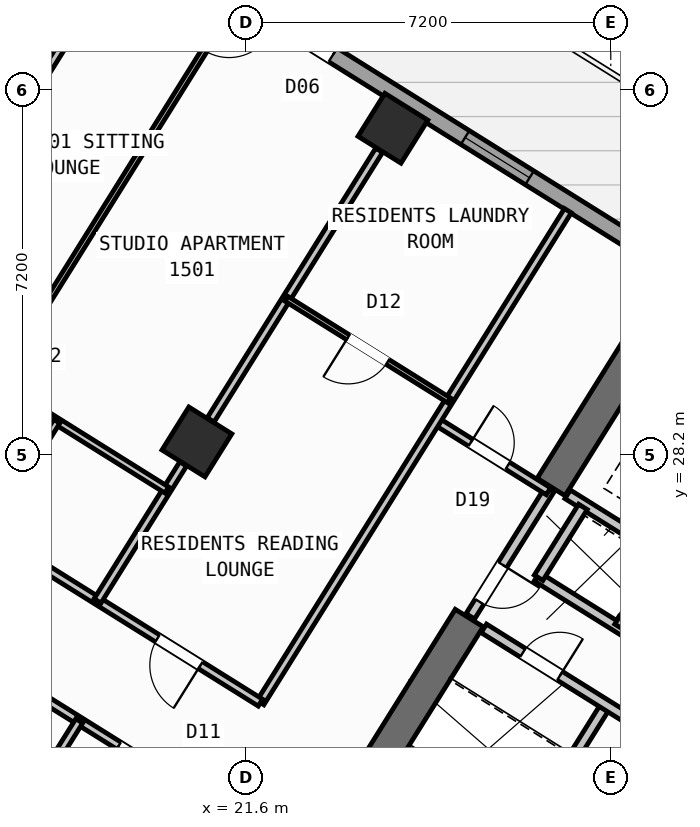
"""IFC4 building model, lengths in metres.
Left out: names, types, materials, properties, quantities, classifications, styles, units other than length and angle.
Written with IfcOpenShell. Run it as: python <this file> out.ifc"""

import sys

from ifc_helpers import new_model, si_unit, direction, frame, frame_2d, origin, origin_2d, place, context, subcontext, project, spatial, rectangle, hollow_rectangle, extrude, source, transform, mapped, element, fill, save


model = new_model("IFC4")
c1 = context("Model", 3, precision=1e-05, world=origin(), true_north=direction((0.0, 1.0)))
c2 = subcontext(c1, "Body", "Model", "MODEL_VIEW")
j1 = project(units=[si_unit("LENGTHUNIT", "METRE"), si_unit("PLANEANGLEUNIT", "RADIAN")], contexts=[c1])
p1 = place(None, origin())
s1 = spatial("IfcSite", under=j1, at=p1, CompositionType="ELEMENT")
p2 = place(p1, origin())
s2 = spatial("IfcBuilding", under=s1, at=p2, CompositionType="ELEMENT")
p3 = place(p2, frame((0.0, 0.0, 60.0)))
s3 = spatial("IfcBuildingStorey", under=s2, at=p3, CompositionType="ELEMENT", Elevation=60.0)
p4 = place(p3, frame((29.491, 30.552, 0.0), z_axis=(0.0, 0.0, 1.0), x_axis=(-0.529893103397, -0.8480644427, 0.0)))
e1 = element("IfcWall", 1, at=p4, inside=s3, PredefinedType="SHEAR", context=c2, shape_type="SweptSolid", body=[
    extrude(rectangle(XDim=3.525, YDim=0.65, at=frame_2d((1.763, 0.0))), origin(), (0.0, 0.0, 1.0), 3.35),
])
p5 = place(p3, frame((26.007, 24.976, 0.0), z_axis=(0.0, 0.0, 1.0), x_axis=(-0.529916319127, -0.848049936456, 0.0)))
e2 = element("IfcWall", 2, at=p5, inside=s3, PredefinedType="SHEAR", context=c2, shape_type="SweptSolid", body=[
    extrude(rectangle(XDim=6.375, YDim=0.65, at=frame_2d((3.188, 0.0))), origin(), (0.0, 0.0, 1.0), 3.35),
])
m1 = source(origin(), c2, "Body", "SweptSolid", [
    extrude(hollow_rectangle(XDim=1.0, YDim=1.0, WallThickness=0.04, at=origin_2d()), origin(), (0.0, 0.0, 1.0), 3.6),
])
for number, where, z_axis, x_axis in (
    (3, (24.5, 34.643, 0.0), (0.0, 0.0, 1.0), (-0.848, 0.53, 0.0)),
    (4, (20.632, 28.452, 0.0), (0.0, 0.0, 1.0), (-0.848, 0.53, 0.0)),
):
    element("IfcColumn", number, at=place(p3, frame(where, z_axis=z_axis, x_axis=x_axis)), inside=s3, PredefinedType="COLUMN", context=c2, shape_type="MappedRepresentation", body=[
        mapped(m1, transform((0.0, 0.0, 0.0), scale=1.0)),
    ])
p6 = place(p3, frame((29.268, 6.429, 0.0), z_axis=(0.0, 0.0, 1.0), x_axis=(-0.848049971435, 0.529916263149, 0.0)))
e5 = element("IfcWall", 5, at=p6, inside=s3, PredefinedType="STANDARD", context=c2, shape_type="SweptSolid", body=[
    extrude(rectangle(XDim=31.588, YDim=0.32, at=frame_2d((15.794, 0.0))), origin(), (0.0, 0.0, 1.0), 3.35),
])
p7 = place(p6, frame((16.235, 0.0, 0.0)))
e6 = element("IfcOpeningElement", 6, at=p7, cuts=e5, PredefinedType="OPENING", context=c2, shape_type="SweptSolid", body=[
    extrude(rectangle(XDim=1.2, YDim=2.15, at=frame_2d((0.6, 1.075))), frame((0.0, 0.17, 0.0), z_axis=(0.0, -1.0, 0.0), x_axis=(1.0, 0.0, 0.0)), (0.0, 0.0, 1.0), 0.34),
])
p8 = place(p6, frame((2.989, 0.0, 0.8)))
e7 = element("IfcOpeningElement", 7, at=p8, cuts=e5, PredefinedType="OPENING", context=c2, shape_type="SweptSolid", body=[
    extrude(rectangle(XDim=2.1, YDim=1.55, at=frame_2d((1.05, 0.775))), frame((0.0, 0.17, 0.0), z_axis=(0.0, -1.0, 0.0), x_axis=(1.0, 0.0, 0.0)), (0.0, 0.0, 1.0), 0.34),
])
p9 = place(p6, frame((8.359, 0.0, 0.8)))
e8 = element("IfcOpeningElement", 8, at=p9, cuts=e5, PredefinedType="OPENING", context=c2, shape_type="SweptSolid", body=[
    extrude(rectangle(XDim=2.1, YDim=1.55, at=frame_2d((1.05, 0.775))), frame((0.0, 0.17, 0.0), z_axis=(0.0, -1.0, 0.0), x_axis=(1.0, 0.0, 0.0)), (0.0, 0.0, 1.0), 0.34),
])
p10 = place(p6, frame((13.284, 0.0, 0.95)))
e9 = element("IfcOpeningElement", 9, at=p10, cuts=e5, PredefinedType="OPENING", context=c2, shape_type="SweptSolid", body=[
    extrude(rectangle(XDim=1.2, YDim=1.4, at=frame_2d((0.6, 0.7))), frame((0.0, 0.17, 0.0), z_axis=(0.0, -1.0, 0.0), x_axis=(1.0, 0.0, 0.0)), (0.0, 0.0, 1.0), 0.34),
])
p11 = place(p6, frame((22.374, 0.0, 0.95)))
e10 = element("IfcOpeningElement", 10, at=p11, cuts=e5, PredefinedType="OPENING", context=c2, shape_type="SweptSolid", body=[
    extrude(rectangle(XDim=1.2, YDim=1.4, at=frame_2d((0.6, 0.7))), frame((0.0, 0.17, 0.0), z_axis=(0.0, -1.0, 0.0), x_axis=(1.0, 0.0, 0.0)), (0.0, 0.0, 1.0), 0.34),
])
p12 = place(p6, frame((26.351, 0.0, 1.0)))
e11 = element("IfcOpeningElement", 11, at=p12, cuts=e5, PredefinedType="OPENING", context=c2, shape_type="SweptSolid", body=[
    extrude(rectangle(XDim=0.9, YDim=1.25, at=frame_2d((0.45, 0.625))), frame((0.0, 0.17, 0.0), z_axis=(0.0, -1.0, 0.0), x_axis=(1.0, 0.0, 0.0)), (0.0, 0.0, 1.0), 0.34),
])
p13 = place(p6, frame((29.052, 0.0, 0.85)))
e12 = element("IfcOpeningElement", 12, at=p13, cuts=e5, PredefinedType="OPENING", context=c2, shape_type="SweptSolid", body=[
    extrude(rectangle(XDim=1.8, YDim=1.5, at=frame_2d((0.9, 0.75))), frame((0.0, 0.17, 0.0), z_axis=(0.0, -1.0, 0.0), x_axis=(1.0, 0.0, 0.0)), (0.0, 0.0, 1.0), 0.34),
])
p14 = place(p3, frame((14.138, 41.825, 0.0), z_axis=(0.0, 0.0, 1.0), x_axis=(0.848046498049, -0.529921821731, 0.0)))
e13 = element("IfcWall", 13, at=p14, inside=s3, PredefinedType="STANDARD", context=c2, shape_type="SweptSolid", body=[
    extrude(rectangle(XDim=31.588, YDim=0.32, at=frame_2d((15.794, 0.0))), origin(), (0.0, 0.0, 1.0), 3.35),
])
p15 = place(p14, frame((9.772, 0.0, 0.0)))
e14 = element("IfcOpeningElement", 14, at=p15, cuts=e13, PredefinedType="OPENING", context=c2, shape_type="SweptSolid", body=[
    extrude(rectangle(XDim=1.05, YDim=2.15, at=frame_2d((0.525, 1.075))), frame((0.0, 0.17, 0.0), z_axis=(0.0, -1.0, 0.0), x_axis=(1.0, 0.0, 0.0)), (0.0, 0.0, 1.0), 0.34),
])
p16 = place(p14, frame((0.966, 0.0, 0.85)))
e15 = element("IfcOpeningElement", 15, at=p16, cuts=e13, PredefinedType="OPENING", context=c2, shape_type="SweptSolid", body=[
    extrude(rectangle(XDim=1.5, YDim=1.5, at=frame_2d((0.75, 0.75))), frame((0.0, 0.17, 0.0), z_axis=(0.0, -1.0, 0.0), x_axis=(1.0, 0.0, 0.0)), (0.0, 0.0, 1.0), 0.34),
])
p17 = place(p14, frame((4.121, 0.0, 1.0)))
e16 = element("IfcOpeningElement", 16, at=p17, cuts=e13, PredefinedType="OPENING", context=c2, shape_type="SweptSolid", body=[
    extrude(rectangle(XDim=0.9, YDim=1.25, at=frame_2d((0.45, 0.625))), frame((0.0, 0.17, 0.0), z_axis=(0.0, -1.0, 0.0), x_axis=(1.0, 0.0, 0.0)), (0.0, 0.0, 1.0), 0.34),
])
p18 = place(p14, frame((13.899, 0.0, 0.85)))
e17 = element("IfcOpeningElement", 17, at=p18, cuts=e13, PredefinedType="OPENING", context=c2, shape_type="SweptSolid", body=[
    extrude(rectangle(XDim=1.5, YDim=1.5, at=frame_2d((0.75, 0.75))), frame((0.0, 0.17, 0.0), z_axis=(0.0, -1.0, 0.0), x_axis=(1.0, 0.0, 0.0)), (0.0, 0.0, 1.0), 0.34),
])
p19 = place(p14, frame((22.019, 0.0, 0.95)))
e18 = element("IfcOpeningElement", 18, at=p19, cuts=e13, PredefinedType="OPENING", context=c2, shape_type="SweptSolid", body=[
    extrude(rectangle(XDim=1.2, YDim=1.4, at=frame_2d((0.6, 0.7))), frame((0.0, 0.17, 0.0), z_axis=(0.0, -1.0, 0.0), x_axis=(1.0, 0.0, 0.0)), (0.0, 0.0, 1.0), 0.34),
])
p20 = place(p14, frame((27.569, 0.0, 0.95)))
e19 = element("IfcOpeningElement", 19, at=p20, cuts=e13, PredefinedType="OPENING", context=c2, shape_type="SweptSolid", body=[
    extrude(rectangle(XDim=1.2, YDim=1.4, at=frame_2d((0.6, 0.7))), frame((0.0, 0.17, 0.0), z_axis=(0.0, -1.0, 0.0), x_axis=(1.0, 0.0, 0.0)), (0.0, 0.0, 1.0), 0.34),
])
p21 = place(p3, frame((31.822, 24.998, 0.0), z_axis=(0.0, 0.0, 1.0), x_axis=(-0.848058348634, 0.529902856485, 0.0)))
e20 = element("IfcWall", 20, at=p21, inside=s3, PredefinedType="STANDARD", context=c2, shape_type="SweptSolid", body=[
    extrude(rectangle(XDim=4.568, YDim=0.2, at=frame_2d((2.284, 0.0))), origin(), (0.0, 0.0, 1.0), 3.34),
])
p22 = place(p3, frame((32.108, 22.814, 0.0), z_axis=(0.0, 0.0, 1.0), x_axis=(-0.848042229521, 0.529928652696, 0.0)))
e21 = element("IfcWall", 21, at=p22, inside=s3, PredefinedType="STANDARD", context=c2, shape_type="SweptSolid", body=[
    extrude(rectangle(XDim=5.62, YDim=0.2, at=frame_2d((2.81, 0.0))), origin(), (0.0, 0.0, 1.0), 3.34),
])
p23 = place(p3, frame((28.25, 27.17, 0.0), z_axis=(0.0, 0.0, 1.0), x_axis=(-0.529905827651, -0.848056492117, 0.0)))
e22 = element("IfcWall", 22, at=p23, inside=s3, PredefinedType="STANDARD", context=c2, shape_type="SweptSolid", body=[
    extrude(rectangle(XDim=1.65, YDim=0.2, at=frame_2d((0.825, 0.0))), origin(), (0.0, 0.0, 1.0), 3.34),
])
p24 = place(p3, frame((29.801, 26.142, 0.0), z_axis=(0.0, 0.0, 1.0), x_axis=(-0.529998940003, -0.847998304005, 0.0)))
e23 = element("IfcWall", 23, at=p24, inside=s3, PredefinedType="STANDARD", context=c2, shape_type="SweptSolid", body=[
    extrude(rectangle(XDim=1.58, YDim=0.2, at=frame_2d((0.79, 0.0))), origin(), (0.0, 0.0, 1.0), 3.34),
])
p25 = place(p3, frame((28.71, 23.263, 0.0), z_axis=(0.0, 0.0, 1.0), x_axis=(-0.529907497854, -0.848055448493, 0.0)))
e24 = element("IfcWall", 24, at=p25, inside=s3, PredefinedType="STANDARD", context=c2, shape_type="SweptSolid", body=[
    extrude(rectangle(XDim=2.88, YDim=0.2, at=frame_2d((1.44, 0.0))), origin(), (0.0, 0.0, 1.0), 3.34),
])
p26 = place(p3, frame((31.525, 21.504, 0.0), z_axis=(0.0, 0.0, 1.0), x_axis=(-0.848044998614, 0.529924221305, 0.0)))
e25 = element("IfcWall", 25, at=p26, inside=s3, PredefinedType="STANDARD", context=c2, shape_type="SweptSolid", body=[
    extrude(rectangle(XDim=6.168, YDim=0.2, at=frame_2d((3.084, 0.0))), origin(), (0.0, 0.0, 1.0), 3.34),
])
p27 = place(p26, frame((4.4, 0.0, 0.0)))
e26 = element("IfcOpeningElement", 26, at=p27, cuts=e25, PredefinedType="OPENING", context=c2, shape_type="SweptSolid", body=[
    extrude(rectangle(XDim=0.86, YDim=2.05, at=frame_2d((0.43, 1.025))), frame((0.0, 0.11, 0.0), z_axis=(0.0, -1.0, 0.0), x_axis=(1.0, 0.0, 0.0)), (0.0, 0.0, 1.0), 0.22),
])
p28 = place(p26, frame((1.45, 0.0, 0.0)))
e27 = element("IfcOpeningElement", 27, at=p28, cuts=e25, PredefinedType="OPENING", context=c2, shape_type="SweptSolid", body=[
    extrude(rectangle(XDim=0.86, YDim=2.05, at=frame_2d((0.43, 1.025))), frame((0.0, 0.11, 0.0), z_axis=(0.0, -1.0, 0.0), x_axis=(1.0, 0.0, 0.0)), (0.0, 0.0, 1.0), 0.22),
])
p29 = place(p3, frame((27.596, 27.52, 0.0), z_axis=(0.0, 0.0, 1.0), x_axis=(-0.529865479138, -0.848081702443, 0.0)))
e28 = element("IfcWall", 28, at=p29, inside=s3, PredefinedType="STANDARD", context=c2, shape_type="SweptSolid", body=[
    extrude(rectangle(XDim=2.96, YDim=0.2, at=frame_2d((1.48, 0.0))), origin(), (0.0, 0.0, 1.0), 3.34),
])
p30 = place(p29, frame((1.76, 0.0, 0.0)))
e29 = element("IfcOpeningElement", 29, at=p30, cuts=e28, PredefinedType="OPENING", context=c2, shape_type="SweptSolid", body=[
    extrude(rectangle(XDim=0.86, YDim=2.05, at=frame_2d((0.43, 1.025))), frame((0.0, 0.11, 0.0), z_axis=(0.0, -1.0, 0.0), x_axis=(1.0, 0.0, 0.0)), (0.0, 0.0, 1.0), 0.22),
])
p31 = place(p3, frame((27.57, 27.478, 0.0), z_axis=(0.0, 0.0, 1.0), x_axis=(-0.848050851465, 0.529914854792, 0.0)))
e30 = element("IfcWall", 30, at=p31, inside=s3, PredefinedType="PARTITIONING", context=c2, shape_type="SweptSolid", body=[
    extrude(rectangle(XDim=2.61, YDim=0.16, at=frame_2d((1.305, 0.0))), origin(), (0.0, 0.0, 1.0), 3.34),
])
p32 = place(p31, frame((0.95, 0.0, 0.0)))
e31 = element("IfcOpeningElement", 31, at=p32, cuts=e30, PredefinedType="OPENING", context=c2, shape_type="SweptSolid", body=[
    extrude(rectangle(XDim=0.86, YDim=2.05, at=frame_2d((0.43, 1.025))), frame((0.0, 0.09, 0.0), z_axis=(0.0, -1.0, 0.0), x_axis=(1.0, 0.0, 0.0)), (0.0, 0.0, 1.0), 0.18),
])
p33 = place(p3, frame((27.953, 33.016, 0.0), z_axis=(0.0, 0.0, 1.0), x_axis=(-0.529905022231, -0.848056995381, 0.0)))
e32 = element("IfcWall", 32, at=p33, inside=s3, PredefinedType="PARTITIONING", context=c2, shape_type="SweptSolid", body=[
    extrude(rectangle(XDim=11.45, YDim=0.16, at=frame_2d((5.725, 0.0))), origin(), (0.0, 0.0, 1.0), 3.34),
])
p34 = place(p3, frame((21.885, 23.306, 0.0), z_axis=(0.0, 0.0, 1.0), x_axis=(-0.848052408131, 0.529912363569, 0.0)))
e33 = element("IfcWall", 33, at=p34, inside=s3, PredefinedType="PARTITIONING", context=c2, shape_type="SweptSolid", body=[
    extrude(rectangle(XDim=16.73, YDim=0.16, at=frame_2d((8.365, 0.0))), origin(), (0.0, 0.0, 1.0), 3.34),
])
p35 = place(p34, frame((1.395, 0.0, 0.0)))
e34 = element("IfcOpeningElement", 34, at=p35, cuts=e33, PredefinedType="OPENING", context=c2, shape_type="SweptSolid", body=[
    extrude(rectangle(XDim=1.0, YDim=2.1, at=frame_2d((0.5, 1.05))), frame((0.0, 0.09, 0.0), z_axis=(0.0, -1.0, 0.0), x_axis=(1.0, 0.0, 0.0)), (0.0, 0.0, 1.0), 0.18),
])
p36 = place(p34, frame((7.82, 0.0, 0.0)))
e35 = element("IfcOpeningElement", 35, at=p36, cuts=e33, PredefinedType="OPENING", context=c2, shape_type="SweptSolid", body=[
    extrude(rectangle(XDim=1.0, YDim=2.1, at=frame_2d((0.5, 1.05))), frame((0.0, 0.09, 0.0), z_axis=(0.0, -1.0, 0.0), x_axis=(1.0, 0.0, 0.0)), (0.0, 0.0, 1.0), 0.18),
])
p37 = place(p34, frame((11.14, 0.0, 0.0)))
e36 = element("IfcOpeningElement", 36, at=p37, cuts=e33, PredefinedType="OPENING", context=c2, shape_type="SweptSolid", body=[
    extrude(rectangle(XDim=1.0, YDim=2.1, at=frame_2d((0.5, 1.05))), frame((0.0, 0.09, 0.0), z_axis=(0.0, -1.0, 0.0), x_axis=(1.0, 0.0, 0.0)), (0.0, 0.0, 1.0), 0.18),
])
p38 = place(p3, frame((20.719, 21.44, 0.0), z_axis=(0.0, 0.0, 1.0), x_axis=(-0.848048310262, 0.529918921593, 0.0)))
e37 = element("IfcWall", 37, at=p38, inside=s3, PredefinedType="PARTITIONING", context=c2, shape_type="SweptSolid", body=[
    extrude(rectangle(XDim=16.73, YDim=0.16, at=frame_2d((8.365, 0.0))), origin(), (0.0, 0.0, 1.0), 3.34),
])
p39 = place(p38, frame((0.92, 0.0, 0.0)))
e38 = element("IfcOpeningElement", 38, at=p39, cuts=e37, PredefinedType="OPENING", context=c2, shape_type="SweptSolid", body=[
    extrude(rectangle(XDim=1.0, YDim=2.1, at=frame_2d((0.5, 1.05))), frame((0.0, 0.09, 0.0), z_axis=(0.0, -1.0, 0.0), x_axis=(1.0, 0.0, 0.0)), (0.0, 0.0, 1.0), 0.18),
])
p40 = place(p38, frame((4.408, 0.0, 0.0)))
e39 = element("IfcOpeningElement", 39, at=p40, cuts=e37, PredefinedType="OPENING", context=c2, shape_type="SweptSolid", body=[
    extrude(rectangle(XDim=1.0, YDim=2.1, at=frame_2d((0.5, 1.05))), frame((0.0, 0.09, 0.0), z_axis=(0.0, -1.0, 0.0), x_axis=(1.0, 0.0, 0.0)), (0.0, 0.0, 1.0), 0.18),
])
p41 = place(p38, frame((7.271, 0.0, 0.0)))
e40 = element("IfcOpeningElement", 40, at=p41, cuts=e37, PredefinedType="OPENING", context=c2, shape_type="SweptSolid", body=[
    extrude(rectangle(XDim=1.0, YDim=2.1, at=frame_2d((0.5, 1.05))), frame((0.0, 0.09, 0.0), z_axis=(0.0, -1.0, 0.0), x_axis=(1.0, 0.0, 0.0)), (0.0, 0.0, 1.0), 0.18),
])
p42 = place(p38, frame((10.78, 0.0, 0.0)))
e41 = element("IfcOpeningElement", 41, at=p42, cuts=e37, PredefinedType="OPENING", context=c2, shape_type="SweptSolid", body=[
    extrude(rectangle(XDim=1.0, YDim=2.1, at=frame_2d((0.5, 1.05))), frame((0.0, 0.09, 0.0), z_axis=(0.0, -1.0, 0.0), x_axis=(1.0, 0.0, 0.0)), (0.0, 0.0, 1.0), 0.18),
])
p43 = place(p38, frame((14.372, 0.0, 0.0)))
e42 = element("IfcOpeningElement", 42, at=p43, cuts=e37, PredefinedType="OPENING", context=c2, shape_type="SweptSolid", body=[
    extrude(rectangle(XDim=1.0, YDim=2.1, at=frame_2d((0.5, 1.05))), frame((0.0, 0.09, 0.0), z_axis=(0.0, -1.0, 0.0), x_axis=(1.0, 0.0, 0.0)), (0.0, 0.0, 1.0), 0.18),
])
p44 = place(p3, frame((18.31, 22.946, 0.0), z_axis=(0.0, 0.0, 1.0), x_axis=(-0.529914428959, -0.848051117552, 0.0)))
e43 = element("IfcWall", 43, at=p44, inside=s3, PredefinedType="PARTITIONING", context=c2, shape_type="SweptSolid", body=[
    extrude(rectangle(XDim=8.05, YDim=0.16, at=frame_2d((4.025, 0.0))), origin(), (0.0, 0.0, 1.0), 3.34),
])
p45 = place(p3, frame((24.229, 34.209, 0.0), z_axis=(0.0, 0.0, 1.0), x_axis=(-0.529897533635, -0.848061674554, 0.0)))
e44 = element("IfcWall", 44, at=p45, inside=s3, PredefinedType="PARTITIONING", context=c2, shape_type="SweptSolid", body=[
    extrude(rectangle(XDim=6.276, YDim=0.16, at=frame_2d((3.138, 0.0))), origin(), (0.0, 0.0, 1.0), 2.725),
])
p46 = place(p3, frame((20.361, 28.018, 0.0), z_axis=(0.0, 0.0, 1.0), x_axis=(-0.529875025416, -0.848075738033, 0.0)))
e45 = element("IfcWall", 45, at=p46, inside=s3, PredefinedType="PARTITIONING", context=c2, shape_type="SweptSolid", body=[
    extrude(rectangle(XDim=3.188, YDim=0.16, at=frame_2d((1.594, 0.0))), origin(), (0.0, 0.0, 1.0), 2.725),
])
p47 = place(p3, frame((25.612, 29.269, 0.0), z_axis=(0.0, 0.0, 1.0), x_axis=(-0.84803087207, 0.529946827537, 0.0)))
e46 = element("IfcWall", 46, at=p47, inside=s3, PredefinedType="PARTITIONING", context=c2, shape_type="SweptSolid", body=[
    extrude(rectangle(XDim=3.79, YDim=0.11, at=frame_2d((1.895, 0.0))), origin(), (0.0, 0.0, 1.0), 3.34),
])
p48 = place(p47, frame((1.435, 0.0, 0.0)))
e47 = element("IfcOpeningElement", 47, at=p48, cuts=e46, PredefinedType="OPENING", context=c2, shape_type="SweptSolid", body=[
    extrude(rectangle(XDim=0.92, YDim=2.08, at=frame_2d((0.46, 1.04))), frame((0.0, 0.065, 0.0), z_axis=(0.0, -1.0, 0.0), x_axis=(1.0, 0.0, 0.0)), (0.0, 0.0, 1.0), 0.13),
])
p49 = place(p3, frame((18.802, 37.6, 0.0), z_axis=(0.0, 0.0, 1.0), x_axis=(-0.529915015264, -0.848050751193, 0.0)))
e48 = element("IfcWall", 48, at=p49, inside=s3, PredefinedType="PARTITIONING", context=c2, shape_type="SweptSolid", body=[
    extrude(rectangle(XDim=6.276, YDim=0.16, at=frame_2d((3.138, 0.0))), origin(), (0.0, 0.0, 1.0), 2.725),
])
p50 = place(p3, frame((20.039, 27.502, 0.0), z_axis=(0.0, 0.0, 1.0), x_axis=(-0.848039019877, 0.529933789039, 0.0)))
e49 = element("IfcWall", 49, at=p50, inside=s3, PredefinedType="PLUMBINGWALL", context=c2, shape_type="SweptSolid", body=[
    extrude(rectangle(XDim=6.4, YDim=0.14, at=frame_2d((3.2, 0.0))), origin(), (0.0, 0.0, 1.0), 3.34),
])
p51 = place(p50, frame((2.824, 0.0, 0.0)))
e50 = element("IfcOpeningElement", 50, at=p51, cuts=e49, PredefinedType="OPENING", context=c2, shape_type="SweptSolid", body=[
    extrude(rectangle(XDim=0.78, YDim=2.05, at=frame_2d((0.39, 1.025))), frame((0.0, 0.08, 0.0), z_axis=(0.0, -1.0, 0.0), x_axis=(1.0, 0.0, 0.0)), (0.0, 0.0, 1.0), 0.16),
])
p52 = place(p3, frame((17.867, 28.859, 0.0), z_axis=(0.0, 0.0, 1.0), x_axis=(-0.529913878929, -0.848051461244, 0.0)))
e51 = element("IfcWall", 51, at=p52, inside=s3, PredefinedType="PLUMBINGWALL", context=c2, shape_type="SweptSolid", body=[
    extrude(rectangle(XDim=2.58, YDim=0.14, at=frame_2d((1.29, 0.0))), origin(), (0.0, 0.0, 1.0), 3.34),
])
p53 = place(p52, frame((0.9, 0.0, 0.0)))
e52 = element("IfcOpeningElement", 52, at=p53, cuts=e51, PredefinedType="OPENING", context=c2, shape_type="SweptSolid", body=[
    extrude(rectangle(XDim=0.78, YDim=2.05, at=frame_2d((0.39, 1.025))), frame((0.0, 0.08, 0.0), z_axis=(0.0, -1.0, 0.0), x_axis=(1.0, 0.0, 0.0)), (0.0, 0.0, 1.0), 0.16),
])
p54 = place(p3, frame((21.517, 37.356, 0.0), z_axis=(0.0, 0.0, 1.0), x_axis=(-0.529919705034, -0.848047820713, 0.0)))
e53 = element("IfcWall", 53, at=p54, inside=s3, PredefinedType="PARTITIONING", context=c2, shape_type="SweptSolid", body=[
    extrude(rectangle(XDim=9.14, YDim=0.11, at=frame_2d((4.57, 0.0))), origin(), (0.0, 0.0, 1.0), 3.34),
])
p55 = place(p54, frame((0.47, 0.0, 0.0)))
e54 = element("IfcOpeningElement", 54, at=p55, cuts=e53, PredefinedType="OPENING", context=c2, shape_type="SweptSolid", body=[
    extrude(rectangle(XDim=0.92, YDim=2.08, at=frame_2d((0.46, 1.04))), frame((0.0, 0.065, 0.0), z_axis=(0.0, -1.0, 0.0), x_axis=(1.0, 0.0, 0.0)), (0.0, 0.0, 1.0), 0.13),
])
m2 = source(origin(), c2, "Body", "SweptSolid", [
    extrude(rectangle(XDim=1.05, YDim=2.15, at=frame_2d((0.525, 1.075))), frame((0.0, 0.025, 0.0), z_axis=(0.0, -1.0, 0.0), x_axis=(1.0, 0.0, 0.0)), (0.0, 0.0, 1.0), 0.05),
])
p56 = place(p15, origin())
e55 = element("IfcDoor", 55, at=p56, inside=s3, OperationType="SINGLE_SWING_RIGHT", PredefinedType="DOOR", context=c2, shape_type="MappedRepresentation", body=[
    mapped(m2, transform((0.0, 0.0, 0.0), scale=1.0)),
])
fill(e14, e55)
m3 = source(origin(), c2, "Body", "SweptSolid", [
    extrude(rectangle(XDim=1.5, YDim=1.5, at=frame_2d((0.75, 0.75))), frame((0.0, 0.03, 0.0), z_axis=(0.0, -1.0, 0.0), x_axis=(1.0, 0.0, 0.0)), (0.0, 0.0, 1.0), 0.06),
])
p57 = place(p18, origin())
e56 = element("IfcWindow", 56, at=p57, inside=s3, PartitioningType="SINGLE_PANEL", PredefinedType="WINDOW", context=c2, shape_type="MappedRepresentation", body=[
    mapped(m3, transform((0.0, 0.0, 0.0), scale=1.0)),
])
fill(e17, e56)
m4 = source(origin(), c2, "Body", "SweptSolid", [
    extrude(rectangle(XDim=0.86, YDim=2.05, at=frame_2d((0.43, 1.025))), frame((0.0, 0.025, 0.0), z_axis=(0.0, -1.0, 0.0), x_axis=(1.0, 0.0, 0.0)), (0.0, 0.0, 1.0), 0.05),
])
p58 = place(p27, frame((0.86, 0.0, 0.0), z_axis=(0.0, 0.0, 1.0), x_axis=(-1.0, 0.0, 0.0)))
e57 = element("IfcDoor", 57, at=p58, inside=s3, OperationType="SINGLE_SWING_RIGHT", PredefinedType="DOOR", context=c2, shape_type="MappedRepresentation", body=[
    mapped(m4, transform((0.0, 0.0, 0.0), scale=1.0)),
])
fill(e26, e57)
p59 = place(p32, frame((0.86, 0.0, 0.0), z_axis=(0.0, 0.0, 1.0), x_axis=(-1.0, 0.0, 0.0)))
e58 = element("IfcDoor", 58, at=p59, inside=s3, OperationType="SINGLE_SWING_LEFT", PredefinedType="DOOR", context=c2, shape_type="MappedRepresentation", body=[
    mapped(m4, transform((0.0, 0.0, 0.0), scale=1.0)),
])
fill(e31, e58)
p60 = place(p30, origin())
e59 = element("IfcDoor", 59, at=p60, inside=s3, OperationType="SINGLE_SWING_LEFT", PredefinedType="DOOR", context=c2, shape_type="MappedRepresentation", body=[
    mapped(m4, transform((0.0, 0.0, 0.0), scale=1.0)),
])
fill(e29, e59)
m5 = source(origin(), c2, "Body", "SweptSolid", [
    extrude(rectangle(XDim=1.0, YDim=2.1, at=frame_2d((0.5, 1.05))), frame((0.0, 0.025, 0.0), z_axis=(0.0, -1.0, 0.0), x_axis=(1.0, 0.0, 0.0)), (0.0, 0.0, 1.0), 0.05),
])
p61 = place(p39, origin())
e60 = element("IfcDoor", 60, at=p61, inside=s3, OperationType="SINGLE_SWING_RIGHT", PredefinedType="DOOR", context=c2, shape_type="MappedRepresentation", body=[
    mapped(m5, transform((0.0, 0.0, 0.0), scale=1.0)),
])
fill(e38, e60)
p62 = place(p35, origin())
e61 = element("IfcDoor", 61, at=p62, inside=s3, OperationType="SINGLE_SWING_LEFT", PredefinedType="DOOR", context=c2, shape_type="MappedRepresentation", body=[
    mapped(m5, transform((0.0, 0.0, 0.0), scale=1.0)),
])
fill(e34, e61)
m6 = source(origin(), c2, "Body", "SweptSolid", [
    extrude(rectangle(XDim=0.92, YDim=2.08, at=frame_2d((0.46, 1.04))), frame((0.0, 0.025, 0.0), z_axis=(0.0, -1.0, 0.0), x_axis=(1.0, 0.0, 0.0)), (0.0, 0.0, 1.0), 0.05),
])
p63 = place(p48, origin())
e62 = element("IfcDoor", 62, at=p63, inside=s3, OperationType="SINGLE_SWING_RIGHT", PredefinedType="DOOR", context=c2, shape_type="MappedRepresentation", body=[
    mapped(m6, transform((0.0, 0.0, 0.0), scale=1.0)),
])
fill(e47, e62)
save(model, sys.argv[1])
